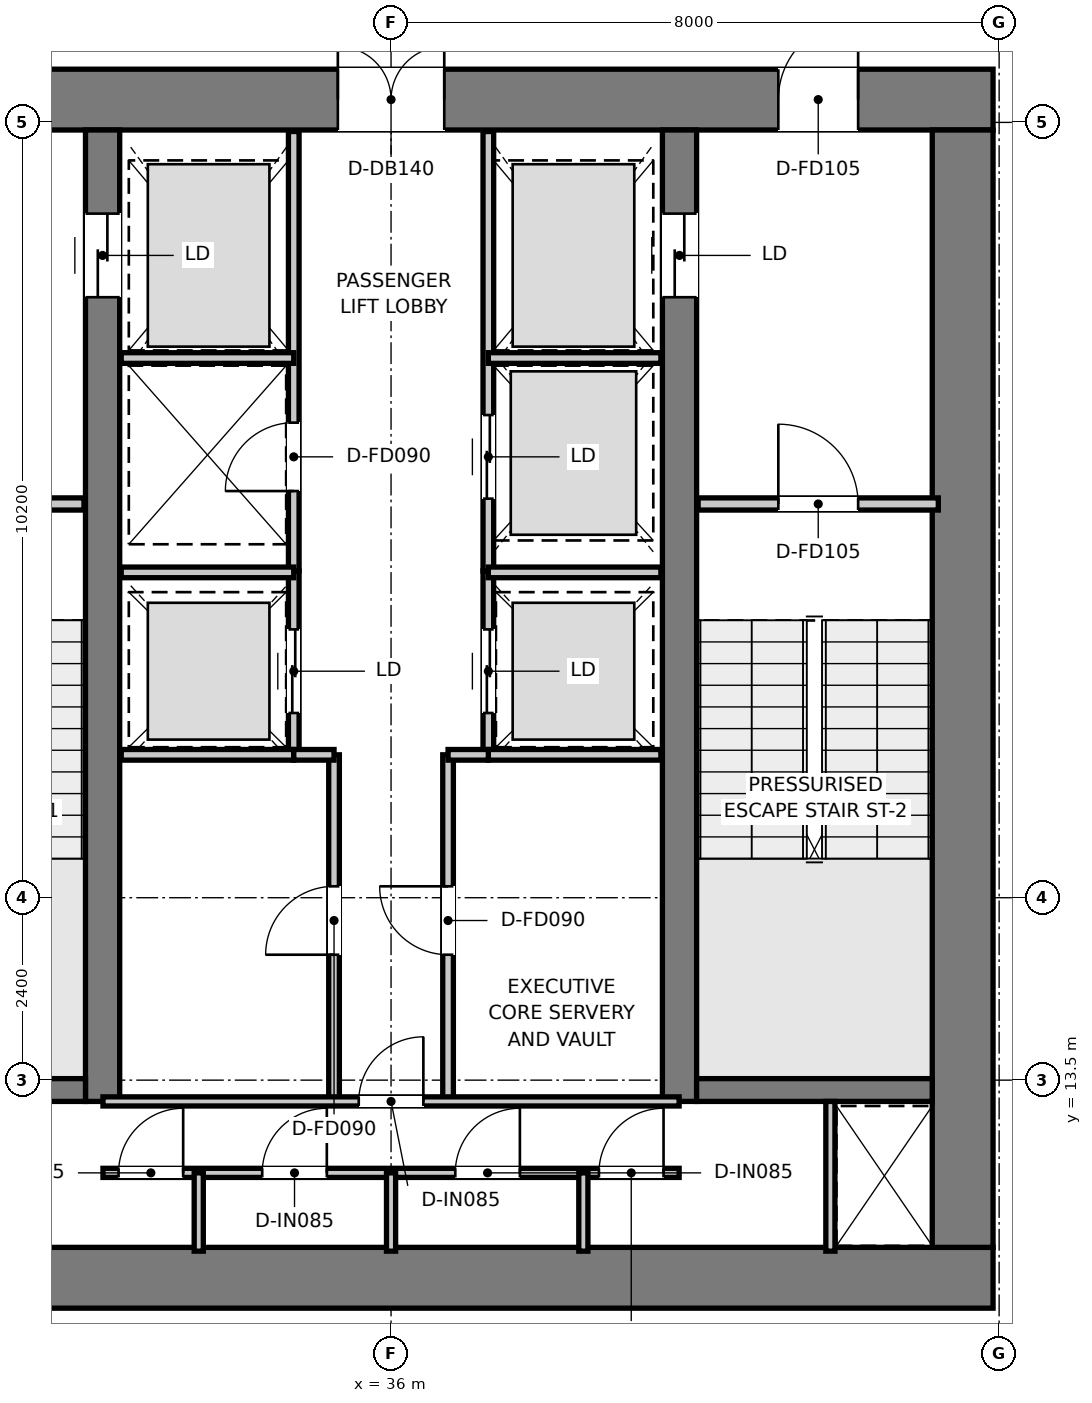
"""IFC4 building model, lengths in metres.
Left out: names, types, materials, properties, quantities, classifications, styles, units other than length and angle.
Written with IfcOpenShell. Run it as: python <this file> out.ifc"""

import sys

from ifc_helpers import new_model, si_unit, direction, frame, frame_2d, origin, place, context, subcontext, project, spatial, rectangle, extrude, element, fill, save


model = new_model("IFC4")
c1 = context("Model", 3, precision=1e-05, world=origin(), true_north=direction((0.0, 1.0)))
c2 = subcontext(c1, "Body", "Model", "MODEL_VIEW")
j1 = project(units=[si_unit("LENGTHUNIT", "METRE"), si_unit("PLANEANGLEUNIT", "RADIAN")], contexts=[c1])
p1 = place(None, origin())
s1 = spatial("IfcSite", under=j1, at=p1, CompositionType="ELEMENT")
p2 = place(p1, origin())
s2 = spatial("IfcBuilding", under=s1, at=p2, CompositionType="ELEMENT")
p3 = place(p2, frame((0.0, 0.0, 283.2)))
s3 = spatial("IfcBuildingStorey", under=s2, at=p3, CompositionType="ELEMENT", Elevation=283.2)
p4 = place(p3, frame((28.08, 10.9, 0.0), z_axis=(0.0, 0.0, 1.0), x_axis=(1.0, 0.0, 0.0)))
e1 = element("IfcWall", 1, at=p4, inside=s3, PredefinedType="SHEAR", context=c2, shape_type="SweptSolid", body=[
    extrude(rectangle(XDim=15.84, YDim=0.8, at=frame_2d((7.92, 0.0))), origin(), (0.0, 0.0, 1.0), 3.95),
])
p5 = place(p3, frame((28.08, 26.4, 0.0), z_axis=(0.0, 0.0, 1.0), x_axis=(1.0, 0.0, 0.0)))
e2 = element("IfcWall", 2, at=p5, inside=s3, PredefinedType="SHEAR", context=c2, shape_type="SweptSolid", body=[
    extrude(rectangle(XDim=15.84, YDim=0.8, at=frame_2d((7.92, 0.0))), origin(), (0.0, 0.0, 1.0), 3.95),
])
p6 = place(p5, frame((7.22, 0.0, 0.0)))
e3 = element("IfcOpeningElement", 3, at=p6, cuts=e2, PredefinedType="OPENING", context=c2, shape_type="SweptSolid", body=[
    extrude(rectangle(XDim=1.4, YDim=2.2, at=frame_2d((0.7, 1.1))), frame((0.0, 0.41, 0.0), z_axis=(0.0, -1.0, 0.0), x_axis=(1.0, 0.0, 0.0)), (0.0, 0.0, 1.0), 0.82),
])
p7 = place(p5, frame((1.775, 0.0, 0.0)))
e4 = element("IfcOpeningElement", 4, at=p7, cuts=e2, PredefinedType="OPENING", context=c2, shape_type="SweptSolid", body=[
    extrude(rectangle(XDim=1.05, YDim=2.1, at=frame_2d((0.525, 1.05))), frame((0.0, 0.41, 0.0), z_axis=(0.0, -1.0, 0.0), x_axis=(1.0, 0.0, 0.0)), (0.0, 0.0, 1.0), 0.82),
])
p8 = place(p5, frame((13.015, 0.0, 0.0)))
e5 = element("IfcOpeningElement", 5, at=p8, cuts=e2, PredefinedType="OPENING", context=c2, shape_type="SweptSolid", body=[
    extrude(rectangle(XDim=1.05, YDim=2.1, at=frame_2d((0.525, 1.05))), frame((0.0, 0.41, 0.0), z_axis=(0.0, -1.0, 0.0), x_axis=(1.0, 0.0, 0.0)), (0.0, 0.0, 1.0), 0.82),
])
p9 = place(p3, frame((43.52, 11.3, 0.0), z_axis=(0.0, 0.0, 1.0), x_axis=(0.0, 1.0, 0.0)))
e6 = element("IfcWall", 6, at=p9, inside=s3, PredefinedType="SHEAR", context=c2, shape_type="SweptSolid", body=[
    extrude(rectangle(XDim=14.7, YDim=0.8, at=frame_2d((7.35, 0.0))), origin(), (0.0, 0.0, 1.0), 3.95),
])
p10 = place(p3, frame((32.205, 13.22, 0.0), z_axis=(0.0, 0.0, 1.0), x_axis=(0.0, 1.0, 0.0)))
e7 = element("IfcWall", 7, at=p10, inside=s3, PredefinedType="SHEAR", context=c2, shape_type="SweptSolid", body=[
    extrude(rectangle(XDim=12.78, YDim=0.45, at=frame_2d((6.39, 0.0))), origin(), (0.0, 0.0, 1.0), 3.95),
])
p11 = place(p10, frame((10.58, 0.0, 0.0)))
e8 = element("IfcOpeningElement", 8, at=p11, cuts=e7, PredefinedType="OPENING", context=c2, shape_type="SweptSolid", body=[
    extrude(rectangle(XDim=1.1, YDim=2.15, at=frame_2d((0.55, 1.075))), frame((0.0, 0.235, 0.0), z_axis=(0.0, -1.0, 0.0), x_axis=(1.0, 0.0, 0.0)), (0.0, 0.0, 1.0), 0.47),
])
p12 = place(p3, frame((39.795, 13.22, 0.0), z_axis=(0.0, 0.0, 1.0), x_axis=(0.0, 1.0, 0.0)))
e9 = element("IfcWall", 9, at=p12, inside=s3, PredefinedType="SHEAR", context=c2, shape_type="SweptSolid", body=[
    extrude(rectangle(XDim=12.78, YDim=0.45, at=frame_2d((6.39, 0.0))), origin(), (0.0, 0.0, 1.0), 3.95),
])
p13 = place(p12, frame((10.58, 0.0, 0.0)))
e10 = element("IfcOpeningElement", 10, at=p13, cuts=e9, PredefinedType="OPENING", context=c2, shape_type="SweptSolid", body=[
    extrude(rectangle(XDim=1.1, YDim=2.15, at=frame_2d((0.55, 1.075))), frame((0.0, 0.235, 0.0), z_axis=(0.0, -1.0, 0.0), x_axis=(1.0, 0.0, 0.0)), (0.0, 0.0, 1.0), 0.47),
])
for number, where, z_axis, x_axis in (
    (11, (28.88, 13.37, 0.0), (0.0, 0.0, 1.0), (1.0, 0.0, 0.0)),
    (12, (40.02, 13.37, 0.0), (0.0, 0.0, 1.0), (1.0, 0.0, 0.0)),
):
    element("IfcWall", number, at=place(p3, frame(where, z_axis=z_axis, x_axis=x_axis)), inside=s3, PredefinedType="SHEAR", context=c2, shape_type="SweptSolid", body=[
        extrude(rectangle(XDim=3.1, YDim=0.3, at=frame_2d((1.55, 0.0))), origin(), (0.0, 0.0, 1.0), 3.95),
    ])
p14 = place(p3, frame((28.8, 21.08, 0.0), z_axis=(0.0, 0.0, 1.0), x_axis=(1.0, 0.0, 0.0)))
e13 = element("IfcWall", 13, at=p14, inside=s3, PredefinedType="PARTITIONING", context=c2, shape_type="SweptSolid", body=[
    extrude(rectangle(XDim=3.16, YDim=0.16, at=frame_2d((1.58, 0.0))), origin(), (0.0, 0.0, 1.0), 3.67),
])
p15 = place(p14, frame((1.055, 0.0, 0.0)))
e14 = element("IfcOpeningElement", 14, at=p15, cuts=e13, PredefinedType="OPENING", context=c2, shape_type="SweptSolid", body=[
    extrude(rectangle(XDim=1.05, YDim=2.1, at=frame_2d((0.525, 1.05))), frame((0.0, 0.09, 0.0), z_axis=(0.0, -1.0, 0.0), x_axis=(1.0, 0.0, 0.0)), (0.0, 0.0, 1.0), 0.18),
])
p16 = place(p3, frame((40.04, 21.08, 0.0), z_axis=(0.0, 0.0, 1.0), x_axis=(1.0, 0.0, 0.0)))
e15 = element("IfcWall", 15, at=p16, inside=s3, PredefinedType="PARTITIONING", context=c2, shape_type="SweptSolid", body=[
    extrude(rectangle(XDim=3.16, YDim=0.16, at=frame_2d((1.58, 0.0))), origin(), (0.0, 0.0, 1.0), 3.67),
])
p17 = place(p16, frame((1.055, 0.0, 0.0)))
e16 = element("IfcOpeningElement", 16, at=p17, cuts=e15, PredefinedType="OPENING", context=c2, shape_type="SweptSolid", body=[
    extrude(rectangle(XDim=1.05, YDim=2.1, at=frame_2d((0.525, 1.05))), frame((0.0, 0.09, 0.0), z_axis=(0.0, -1.0, 0.0), x_axis=(1.0, 0.0, 0.0)), (0.0, 0.0, 1.0), 0.18),
])
p18 = place(p3, frame((34.72, 20.2, 0.0), z_axis=(0.0, 0.0, 1.0), x_axis=(0.0, 1.0, 0.0)))
e17 = element("IfcWall", 17, at=p18, inside=s3, PredefinedType="PARTITIONING", context=c2, shape_type="SweptSolid", body=[
    extrude(rectangle(XDim=5.78, YDim=0.14, at=frame_2d((2.89, 0.0))), origin(), (0.0, 0.0, 1.0), 2.82),
])
p19 = place(p18, frame((1.05, 0.0, 0.0)))
e18 = element("IfcOpeningElement", 18, at=p19, cuts=e17, PredefinedType="OPENING", context=c2, shape_type="SweptSolid", body=[
    extrude(rectangle(XDim=0.9, YDim=2.1, at=frame_2d((0.45, 1.05))), frame((0.0, 0.08, 0.0), z_axis=(0.0, -1.0, 0.0), x_axis=(1.0, 0.0, 0.0)), (0.0, 0.0, 1.0), 0.16),
])
p20 = place(p3, frame((37.28, 20.2, 0.0), z_axis=(0.0, 0.0, 1.0), x_axis=(0.0, 1.0, 0.0)))
e19 = element("IfcWall", 19, at=p20, inside=s3, PredefinedType="PARTITIONING", context=c2, shape_type="SweptSolid", body=[
    extrude(rectangle(XDim=5.78, YDim=0.14, at=frame_2d((2.89, 0.0))), origin(), (0.0, 0.0, 1.0), 2.82),
])
p21 = place(p20, frame((0.95, 0.0, 0.0)))
e20 = element("IfcOpeningElement", 20, at=p21, cuts=e19, PredefinedType="OPENING", context=c2, shape_type="SweptSolid", body=[
    extrude(rectangle(XDim=1.1, YDim=2.15, at=frame_2d((0.55, 1.075))), frame((0.0, 0.08, 0.0), z_axis=(0.0, -1.0, 0.0), x_axis=(1.0, 0.0, 0.0)), (0.0, 0.0, 1.0), 0.16),
])
for number, where, z_axis, x_axis in (
    (21, (32.45, 23.0, 0.0), (0.0, 0.0, 1.0), (1.0, 0.0, 0.0)),
    (22, (37.28, 23.0, 0.0), (0.0, 0.0, 1.0), (1.0, 0.0, 0.0)),
):
    element("IfcWall", number, at=place(p3, frame(where, z_axis=z_axis, x_axis=x_axis)), inside=s3, PredefinedType="PARTITIONING", context=c2, shape_type="SweptSolid", body=[
        extrude(rectangle(XDim=2.27, YDim=0.14, at=frame_2d((1.135, 0.0))), origin(), (0.0, 0.0, 1.0), 2.82),
    ])
p22 = place(p3, frame((34.72, 17.78, 0.0), z_axis=(0.0, 0.0, 1.0), x_axis=(0.0, 1.0, 0.0)))
e23 = element("IfcWall", 23, at=p22, inside=s3, PredefinedType="PARTITIONING", context=c2, shape_type="SweptSolid", body=[
    extrude(rectangle(XDim=2.42, YDim=0.14, at=frame_2d((1.21, 0.0))), origin(), (0.0, 0.0, 1.0), 3.67),
])
p23 = place(p22, frame((0.55, 0.0, 0.0)))
e24 = element("IfcOpeningElement", 24, at=p23, cuts=e23, PredefinedType="OPENING", context=c2, shape_type="SweptSolid", body=[
    extrude(rectangle(XDim=1.1, YDim=2.15, at=frame_2d((0.55, 1.075))), frame((0.0, 0.08, 0.0), z_axis=(0.0, -1.0, 0.0), x_axis=(1.0, 0.0, 0.0)), (0.0, 0.0, 1.0), 0.16),
])
p24 = place(p3, frame((37.28, 17.78, 0.0), z_axis=(0.0, 0.0, 1.0), x_axis=(0.0, 1.0, 0.0)))
e25 = element("IfcWall", 25, at=p24, inside=s3, PredefinedType="PARTITIONING", context=c2, shape_type="SweptSolid", body=[
    extrude(rectangle(XDim=2.42, YDim=0.14, at=frame_2d((1.21, 0.0))), origin(), (0.0, 0.0, 1.0), 3.67),
])
p25 = place(p24, frame((0.55, 0.0, 0.0)))
e26 = element("IfcOpeningElement", 26, at=p25, cuts=e25, PredefinedType="OPENING", context=c2, shape_type="SweptSolid", body=[
    extrude(rectangle(XDim=1.1, YDim=2.15, at=frame_2d((0.55, 1.075))), frame((0.0, 0.08, 0.0), z_axis=(0.0, -1.0, 0.0), x_axis=(1.0, 0.0, 0.0)), (0.0, 0.0, 1.0), 0.16),
])
for number, where, z_axis, x_axis in (
    (27, (32.45, 17.78, 0.0), (0.0, 0.0, 1.0), (1.0, 0.0, 0.0)),
    (28, (32.45, 20.18, 0.0), (0.0, 0.0, 1.0), (1.0, 0.0, 0.0)),
    (29, (37.28, 17.78, 0.0), (0.0, 0.0, 1.0), (1.0, 0.0, 0.0)),
    (30, (37.28, 20.18, 0.0), (0.0, 0.0, 1.0), (1.0, 0.0, 0.0)),
):
    element("IfcWall", number, at=place(p3, frame(where, z_axis=z_axis, x_axis=x_axis)), inside=s3, PredefinedType="PARTITIONING", context=c2, shape_type="SweptSolid", body=[
        extrude(rectangle(XDim=2.27, YDim=0.14, at=frame_2d((1.135, 0.0))), origin(), (0.0, 0.0, 1.0), 3.67),
    ])
p26 = place(p3, frame((35.25, 13.22, 0.0), z_axis=(0.0, 0.0, 1.0), x_axis=(0.0, 1.0, 0.0)))
e31 = element("IfcWall", 31, at=p26, inside=s3, PredefinedType="PARTITIONING", context=c2, shape_type="SweptSolid", body=[
    extrude(rectangle(XDim=4.56, YDim=0.14, at=frame_2d((2.28, 0.0))), origin(), (0.0, 0.0, 1.0), 3.67),
])
p27 = place(p26, frame((1.93, 0.0, 0.0)))
e32 = element("IfcOpeningElement", 32, at=p27, cuts=e31, PredefinedType="OPENING", context=c2, shape_type="SweptSolid", body=[
    extrude(rectangle(XDim=0.9, YDim=2.1, at=frame_2d((0.45, 1.05))), frame((0.0, 0.08, 0.0), z_axis=(0.0, -1.0, 0.0), x_axis=(1.0, 0.0, 0.0)), (0.0, 0.0, 1.0), 0.16),
])
p28 = place(p3, frame((34.72, 17.78, 0.0), z_axis=(0.0, 0.0, 1.0), x_axis=(1.0, 0.0, 0.0)))
e33 = element("IfcWall", 33, at=p28, inside=s3, PredefinedType="PARTITIONING", context=c2, shape_type="SweptSolid", body=[
    extrude(rectangle(XDim=0.53, YDim=0.14, at=frame_2d((0.265, 0.0))), origin(), (0.0, 0.0, 1.0), 3.67),
])
p29 = place(p3, frame((36.75, 13.22, 0.0), z_axis=(0.0, 0.0, 1.0), x_axis=(0.0, 1.0, 0.0)))
e34 = element("IfcWall", 34, at=p29, inside=s3, PredefinedType="PARTITIONING", context=c2, shape_type="SweptSolid", body=[
    extrude(rectangle(XDim=4.56, YDim=0.14, at=frame_2d((2.28, 0.0))), origin(), (0.0, 0.0, 1.0), 3.67),
])
p30 = place(p29, frame((1.93, 0.0, 0.0)))
e35 = element("IfcOpeningElement", 35, at=p30, cuts=e34, PredefinedType="OPENING", context=c2, shape_type="SweptSolid", body=[
    extrude(rectangle(XDim=0.9, YDim=2.1, at=frame_2d((0.45, 1.05))), frame((0.0, 0.08, 0.0), z_axis=(0.0, -1.0, 0.0), x_axis=(1.0, 0.0, 0.0)), (0.0, 0.0, 1.0), 0.16),
])
p31 = place(p3, frame((36.75, 17.78, 0.0), z_axis=(0.0, 0.0, 1.0), x_axis=(1.0, 0.0, 0.0)))
e36 = element("IfcWall", 36, at=p31, inside=s3, PredefinedType="PARTITIONING", context=c2, shape_type="SweptSolid", body=[
    extrude(rectangle(XDim=0.53, YDim=0.14, at=frame_2d((0.265, 0.0))), origin(), (0.0, 0.0, 1.0), 3.67),
])
p32 = place(p3, frame((41.78, 11.25, 0.0), z_axis=(0.0, 0.0, 1.0), x_axis=(0.0, 1.0, 0.0)))
e37 = element("IfcWall", 37, at=p32, inside=s3, PredefinedType="PARTITIONING", context=c2, shape_type="SweptSolid", body=[
    extrude(rectangle(XDim=1.97, YDim=0.12, at=frame_2d((0.985, 0.0))), origin(), (0.0, 0.0, 1.0), 3.67),
])
p33 = place(p3, frame((32.21, 13.22, 0.0), z_axis=(0.0, 0.0, 1.0), x_axis=(1.0, 0.0, 0.0)))
e38 = element("IfcWall", 38, at=p33, inside=s3, PredefinedType="PARTITIONING", context=c2, shape_type="SweptSolid", body=[
    extrude(rectangle(XDim=7.58, YDim=0.12, at=frame_2d((3.79, 0.0))), origin(), (0.0, 0.0, 1.0), 3.67),
])
p34 = place(p33, frame((3.365, 0.0, 0.0)))
e39 = element("IfcOpeningElement", 39, at=p34, cuts=e38, PredefinedType="OPENING", context=c2, shape_type="SweptSolid", body=[
    extrude(rectangle(XDim=0.85, YDim=2.1, at=frame_2d((0.425, 1.05))), frame((0.0, 0.07, 0.0), z_axis=(0.0, -1.0, 0.0), x_axis=(1.0, 0.0, 0.0)), (0.0, 0.0, 1.0), 0.14),
])
p35 = place(p3, frame((32.21, 12.28, 0.0), z_axis=(0.0, 0.0, 1.0), x_axis=(1.0, 0.0, 0.0)))
e40 = element("IfcWall", 40, at=p35, inside=s3, PredefinedType="PARTITIONING", context=c2, shape_type="SweptSolid", body=[
    extrude(rectangle(XDim=7.58, YDim=0.12, at=frame_2d((3.79, 0.0))), origin(), (0.0, 0.0, 1.0), 3.67),
])
p36 = place(p35, frame((0.205, 0.0, 0.0)))
e41 = element("IfcOpeningElement", 41, at=p36, cuts=e40, PredefinedType="OPENING", context=c2, shape_type="SweptSolid", body=[
    extrude(rectangle(XDim=0.85, YDim=2.1, at=frame_2d((0.425, 1.05))), frame((0.0, 0.07, 0.0), z_axis=(0.0, -1.0, 0.0), x_axis=(1.0, 0.0, 0.0)), (0.0, 0.0, 1.0), 0.14),
])
p37 = place(p35, frame((2.095, 0.0, 0.0)))
e42 = element("IfcOpeningElement", 42, at=p37, cuts=e40, PredefinedType="OPENING", context=c2, shape_type="SweptSolid", body=[
    extrude(rectangle(XDim=0.85, YDim=2.1, at=frame_2d((0.425, 1.05))), frame((0.0, 0.07, 0.0), z_axis=(0.0, -1.0, 0.0), x_axis=(1.0, 0.0, 0.0)), (0.0, 0.0, 1.0), 0.14),
])
p38 = place(p35, frame((4.635, 0.0, 0.0)))
e43 = element("IfcOpeningElement", 43, at=p38, cuts=e40, PredefinedType="OPENING", context=c2, shape_type="SweptSolid", body=[
    extrude(rectangle(XDim=0.85, YDim=2.1, at=frame_2d((0.425, 1.05))), frame((0.0, 0.07, 0.0), z_axis=(0.0, -1.0, 0.0), x_axis=(1.0, 0.0, 0.0)), (0.0, 0.0, 1.0), 0.14),
])
p39 = place(p35, frame((6.525, 0.0, 0.0)))
e44 = element("IfcOpeningElement", 44, at=p39, cuts=e40, PredefinedType="OPENING", context=c2, shape_type="SweptSolid", body=[
    extrude(rectangle(XDim=0.85, YDim=2.1, at=frame_2d((0.425, 1.05))), frame((0.0, 0.07, 0.0), z_axis=(0.0, -1.0, 0.0), x_axis=(1.0, 0.0, 0.0)), (0.0, 0.0, 1.0), 0.14),
])
for number, where, z_axis, x_axis in (
    (45, (33.47, 11.25, 0.0), (0.0, 0.0, 1.0), (0.0, 1.0, 0.0)),
    (46, (36.0, 11.25, 0.0), (0.0, 0.0, 1.0), (0.0, 1.0, 0.0)),
    (47, (38.53, 11.25, 0.0), (0.0, 0.0, 1.0), (0.0, 1.0, 0.0)),
):
    element("IfcWall", number, at=place(p3, frame(where, z_axis=z_axis, x_axis=x_axis)), inside=s3, PredefinedType="PARTITIONING", context=c2, shape_type="SweptSolid", body=[
        extrude(rectangle(XDim=1.03, YDim=0.12, at=frame_2d((0.515, 0.0))), origin(), (0.0, 0.0, 1.0), 3.67),
    ])
p40 = place(p17, origin())
e48 = element("IfcDoor", 48, at=p40, inside=s3, OperationType="SINGLE_SWING_LEFT", PredefinedType="DOOR", context=c2, shape_type="SweptSolid", body=[
    extrude(rectangle(XDim=1.05, YDim=2.1, at=frame_2d((0.525, 1.05))), frame((0.0, 0.025, 0.0), z_axis=(0.0, -1.0, 0.0), x_axis=(1.0, 0.0, 0.0)), (0.0, 0.0, 1.0), 0.05),
])
fill(e16, e48)
p41 = place(p6, origin())
e49 = element("IfcDoor", 49, at=p41, inside=s3, OperationType="DOUBLE_DOOR_SINGLE_SWING", PredefinedType="DOOR", context=c2, shape_type="SweptSolid", body=[
    extrude(rectangle(XDim=1.4, YDim=2.2, at=frame_2d((0.7, 1.1))), frame((0.0, 0.025, 0.0), z_axis=(0.0, -1.0, 0.0), x_axis=(1.0, 0.0, 0.0)), (0.0, 0.0, 1.0), 0.05),
])
fill(e3, e49)
p42 = place(p8, origin())
e50 = element("IfcDoor", 50, at=p42, inside=s3, OperationType="SINGLE_SWING_RIGHT", PredefinedType="DOOR", context=c2, shape_type="SweptSolid", body=[
    extrude(rectangle(XDim=1.05, YDim=2.1, at=frame_2d((0.525, 1.05))), frame((0.0, 0.025, 0.0), z_axis=(0.0, -1.0, 0.0), x_axis=(1.0, 0.0, 0.0)), (0.0, 0.0, 1.0), 0.05),
])
fill(e5, e50)
p43 = place(p11, origin())
e51 = element("IfcDoor", 51, at=p43, inside=s3, OperationType="DOUBLE_DOOR_SLIDING", PredefinedType="DOOR", context=c2, shape_type="SweptSolid", body=[
    extrude(rectangle(XDim=1.1, YDim=2.15, at=frame_2d((0.55, 1.075))), frame((0.0, 0.025, 0.0), z_axis=(0.0, -1.0, 0.0), x_axis=(1.0, 0.0, 0.0)), (0.0, 0.0, 1.0), 0.05),
])
fill(e8, e51)
p44 = place(p13, origin())
e52 = element("IfcDoor", 52, at=p44, inside=s3, OperationType="DOUBLE_DOOR_SLIDING", PredefinedType="DOOR", context=c2, shape_type="SweptSolid", body=[
    extrude(rectangle(XDim=1.1, YDim=2.15, at=frame_2d((0.55, 1.075))), frame((0.0, 0.025, 0.0), z_axis=(0.0, -1.0, 0.0), x_axis=(1.0, 0.0, 0.0)), (0.0, 0.0, 1.0), 0.05),
])
fill(e10, e52)
p45 = place(p19, origin())
e53 = element("IfcDoor", 53, at=p45, inside=s3, OperationType="SINGLE_SWING_LEFT", PredefinedType="DOOR", context=c2, shape_type="SweptSolid", body=[
    extrude(rectangle(XDim=0.9, YDim=2.1, at=frame_2d((0.45, 1.05))), frame((0.0, 0.025, 0.0), z_axis=(0.0, -1.0, 0.0), x_axis=(1.0, 0.0, 0.0)), (0.0, 0.0, 1.0), 0.05),
])
fill(e18, e53)
p46 = place(p21, origin())
e54 = element("IfcDoor", 54, at=p46, inside=s3, OperationType="DOUBLE_DOOR_SLIDING", PredefinedType="DOOR", context=c2, shape_type="SweptSolid", body=[
    extrude(rectangle(XDim=1.1, YDim=2.15, at=frame_2d((0.55, 1.075))), frame((0.0, 0.025, 0.0), z_axis=(0.0, -1.0, 0.0), x_axis=(1.0, 0.0, 0.0)), (0.0, 0.0, 1.0), 0.05),
])
fill(e20, e54)
p47 = place(p23, origin())
e55 = element("IfcDoor", 55, at=p47, inside=s3, OperationType="DOUBLE_DOOR_SLIDING", PredefinedType="DOOR", context=c2, shape_type="SweptSolid", body=[
    extrude(rectangle(XDim=1.1, YDim=2.15, at=frame_2d((0.55, 1.075))), frame((0.0, 0.025, 0.0), z_axis=(0.0, -1.0, 0.0), x_axis=(1.0, 0.0, 0.0)), (0.0, 0.0, 1.0), 0.05),
])
fill(e24, e55)
p48 = place(p25, origin())
e56 = element("IfcDoor", 56, at=p48, inside=s3, OperationType="DOUBLE_DOOR_SLIDING", PredefinedType="DOOR", context=c2, shape_type="SweptSolid", body=[
    extrude(rectangle(XDim=1.1, YDim=2.15, at=frame_2d((0.55, 1.075))), frame((0.0, 0.025, 0.0), z_axis=(0.0, -1.0, 0.0), x_axis=(1.0, 0.0, 0.0)), (0.0, 0.0, 1.0), 0.05),
])
fill(e26, e56)
p49 = place(p27, origin())
e57 = element("IfcDoor", 57, at=p49, inside=s3, OperationType="SINGLE_SWING_LEFT", PredefinedType="DOOR", context=c2, shape_type="SweptSolid", body=[
    extrude(rectangle(XDim=0.9, YDim=2.1, at=frame_2d((0.45, 1.05))), frame((0.0, 0.025, 0.0), z_axis=(0.0, -1.0, 0.0), x_axis=(1.0, 0.0, 0.0)), (0.0, 0.0, 1.0), 0.05),
])
fill(e32, e57)
p50 = place(p30, origin())
e58 = element("IfcDoor", 58, at=p50, inside=s3, OperationType="SINGLE_SWING_RIGHT", PredefinedType="DOOR", context=c2, shape_type="SweptSolid", body=[
    extrude(rectangle(XDim=0.9, YDim=2.1, at=frame_2d((0.45, 1.05))), frame((0.0, 0.025, 0.0), z_axis=(0.0, -1.0, 0.0), x_axis=(1.0, 0.0, 0.0)), (0.0, 0.0, 1.0), 0.05),
])
fill(e35, e58)
p51 = place(p34, origin())
e59 = element("IfcDoor", 59, at=p51, inside=s3, OperationType="SINGLE_SWING_RIGHT", PredefinedType="DOOR", context=c2, shape_type="SweptSolid", body=[
    extrude(rectangle(XDim=0.85, YDim=2.1, at=frame_2d((0.425, 1.05))), frame((0.0, 0.025, 0.0), z_axis=(0.0, -1.0, 0.0), x_axis=(1.0, 0.0, 0.0)), (0.0, 0.0, 1.0), 0.05),
])
fill(e39, e59)
p52 = place(p36, origin())
e60 = element("IfcDoor", 60, at=p52, inside=s3, OperationType="SINGLE_SWING_RIGHT", PredefinedType="DOOR", context=c2, shape_type="SweptSolid", body=[
    extrude(rectangle(XDim=0.85, YDim=2.1, at=frame_2d((0.425, 1.05))), frame((0.0, 0.025, 0.0), z_axis=(0.0, -1.0, 0.0), x_axis=(1.0, 0.0, 0.0)), (0.0, 0.0, 1.0), 0.05),
])
fill(e41, e60)
p53 = place(p37, origin())
e61 = element("IfcDoor", 61, at=p53, inside=s3, OperationType="SINGLE_SWING_RIGHT", PredefinedType="DOOR", context=c2, shape_type="SweptSolid", body=[
    extrude(rectangle(XDim=0.85, YDim=2.1, at=frame_2d((0.425, 1.05))), frame((0.0, 0.025, 0.0), z_axis=(0.0, -1.0, 0.0), x_axis=(1.0, 0.0, 0.0)), (0.0, 0.0, 1.0), 0.05),
])
fill(e42, e61)
p54 = place(p38, origin())
e62 = element("IfcDoor", 62, at=p54, inside=s3, OperationType="SINGLE_SWING_RIGHT", PredefinedType="DOOR", context=c2, shape_type="SweptSolid", body=[
    extrude(rectangle(XDim=0.85, YDim=2.1, at=frame_2d((0.425, 1.05))), frame((0.0, 0.025, 0.0), z_axis=(0.0, -1.0, 0.0), x_axis=(1.0, 0.0, 0.0)), (0.0, 0.0, 1.0), 0.05),
])
fill(e43, e62)
p55 = place(p39, origin())
e63 = element("IfcDoor", 63, at=p55, inside=s3, OperationType="SINGLE_SWING_RIGHT", PredefinedType="DOOR", context=c2, shape_type="SweptSolid", body=[
    extrude(rectangle(XDim=0.85, YDim=2.1, at=frame_2d((0.425, 1.05))), frame((0.0, 0.025, 0.0), z_axis=(0.0, -1.0, 0.0), x_axis=(1.0, 0.0, 0.0)), (0.0, 0.0, 1.0), 0.05),
])
fill(e44, e63)
save(model, sys.argv[1])
